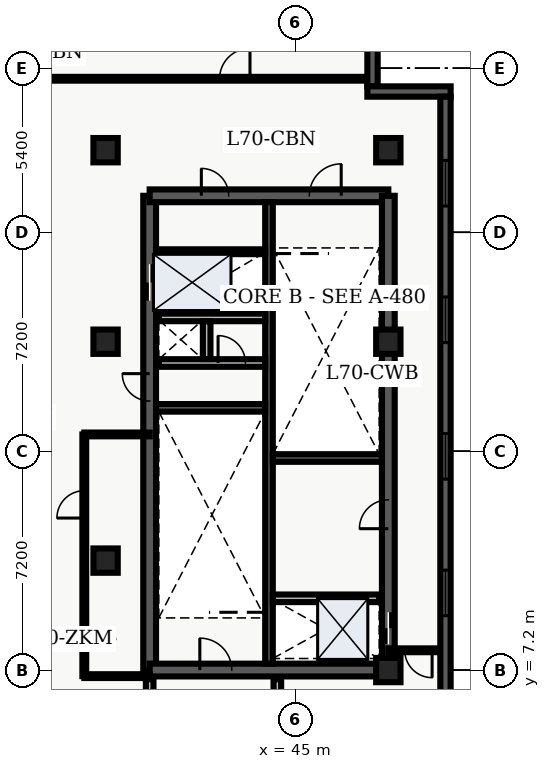
"""IFC4 building model, lengths in metres.
Left out: names, types, materials, properties, quantities, classifications, styles, units other than length and angle.
Written with IfcOpenShell. Run it as: python <this file> out.ifc"""

import sys

from ifc_helpers import new_model, entity, si_unit, converted_unit, direction, frame, origin_with_axes, origin_2d_with_axis, place, context, subcontext, project, spatial, polyline, rectangle, outline, extrude, element, fill, save


model = new_model("IFC4")
c1 = context("Model", 3, precision=1e-05, world=origin_with_axes(), true_north=direction((0.0, 1.0)))
c2 = subcontext(c1, "Body", "Model", "MODEL_VIEW")
j1 = project(units=[si_unit("LENGTHUNIT", "METRE"), converted_unit("PLANEANGLEUNIT", "DEGREE", entity("IfcPlaneAngleMeasure", 0.017), si_unit("PLANEANGLEUNIT", "RADIAN"), dimensions=[0, 0, 0, 0, 0, 0, 0])], contexts=[c1])
p1 = place(None, origin_with_axes())
s1 = spatial("IfcSite", under=j1, at=p1, CompositionType="ELEMENT")
p2 = place(p1, origin_with_axes())
s2 = spatial("IfcBuilding", under=s1, at=p2, CompositionType="ELEMENT")
p3 = place(p2, frame((0.0, 0.0, 284.1), z_axis=(0.0, 0.0, 1.0), x_axis=(1.0, 0.0, 0.0)))
s3 = spatial("IfcBuildingStorey", under=s2, at=p3, CompositionType="ELEMENT", Elevation=284.1)
p4 = place(p3, frame((40.2, 7.2, 0.0), z_axis=(0.0, 0.0, 1.0), x_axis=(0.0, 1.0, 0.0)))
e1 = element("IfcWall", 1, at=p4, inside=s3, PredefinedType="SHEAR", context=c2, shape_type="SweptSolid", body=[
    extrude(outline(polyline([(0.0, -0.21), (15.6, -0.21), (15.6, 0.21), (0.0, 0.21), (0.0, -0.21)])), origin_with_axes(), (0.0, 0.0, 1.0), 3.6),
])
p5 = place(p4, frame((12.75, 0.0, 0.0), z_axis=(0.0, 0.0, 1.0), x_axis=(1.0, 0.0, 0.0)))
e2 = element("IfcOpeningElement", 2, at=p5, cuts=e1, PredefinedType="OPENING", context=c2, shape_type="SweptSolid", body=[
    extrude(rectangle(XDim=1.2, YDim=0.44, at=origin_2d_with_axis()), origin_with_axes(), (0.0, 0.0, 1.0), 2.15),
])
p6 = place(p4, frame((9.3, 0.0, 0.0), z_axis=(0.0, 0.0, 1.0), x_axis=(1.0, 0.0, 0.0)))
e3 = element("IfcOpeningElement", 3, at=p6, cuts=e1, PredefinedType="OPENING", context=c2, shape_type="SweptSolid", body=[
    extrude(rectangle(XDim=0.9, YDim=0.44, at=origin_2d_with_axis()), origin_with_axes(), (0.0, 0.0, 1.0), 2.15),
])
p7 = place(p3, frame((40.2, 7.2, 0.0), z_axis=(0.0, 0.0, 1.0), x_axis=(1.0, 0.0, 0.0)))
e4 = element("IfcWall", 4, at=p7, inside=s3, PredefinedType="SHEAR", context=c2, shape_type="SweptSolid", body=[
    extrude(outline(polyline([(0.0, -0.21), (7.85, -0.21), (7.85, 0.21), (0.0, 0.21), (0.0, -0.21)])), origin_with_axes(), (0.0, 0.0, 1.0), 3.6),
])
p8 = place(p7, frame((2.175, 0.0, 0.0), z_axis=(0.0, 0.0, 1.0), x_axis=(1.0, 0.0, 0.0)))
e5 = element("IfcOpeningElement", 5, at=p8, cuts=e4, PredefinedType="OPENING", context=c2, shape_type="SweptSolid", body=[
    extrude(rectangle(XDim=1.05, YDim=0.44, at=origin_2d_with_axis()), origin_with_axes(), (0.0, 0.0, 1.0), 2.15),
])
p9 = place(p3, frame((40.2, 22.8, 0.0), z_axis=(0.0, 0.0, 1.0), x_axis=(1.0, 0.0, 0.0)))
e6 = element("IfcWall", 6, at=p9, inside=s3, PredefinedType="SHEAR", context=c2, shape_type="SweptSolid", body=[
    extrude(outline(polyline([(0.0, -0.21), (7.85, -0.21), (7.85, 0.21), (0.0, 0.21), (0.0, -0.21)])), origin_with_axes(), (0.0, 0.0, 1.0), 3.6),
])
p10 = place(p9, frame((5.775, 0.0, 0.0), z_axis=(0.0, 0.0, 1.0), x_axis=(1.0, 0.0, 0.0)))
e7 = element("IfcOpeningElement", 7, at=p10, cuts=e6, PredefinedType="OPENING", context=c2, shape_type="SweptSolid", body=[
    extrude(rectangle(XDim=1.05, YDim=0.44, at=origin_2d_with_axis()), origin_with_axes(), (0.0, 0.0, 1.0), 2.15),
])
p11 = place(p9, frame((2.15, 0.0, 0.0), z_axis=(0.0, 0.0, 1.0), x_axis=(1.0, 0.0, 0.0)))
e8 = element("IfcOpeningElement", 8, at=p11, cuts=e6, PredefinedType="OPENING", context=c2, shape_type="SweptSolid", body=[
    extrude(rectangle(XDim=0.9, YDim=0.44, at=origin_2d_with_axis()), origin_with_axes(), (0.0, 0.0, 1.0), 2.15),
])
p12 = place(p3, frame((48.05, 7.2, 0.0), z_axis=(0.0, 0.0, 1.0), x_axis=(0.0, 1.0, 0.0)))
e9 = element("IfcWall", 9, at=p12, inside=s3, PredefinedType="SHEAR", context=c2, shape_type="SweptSolid", body=[
    extrude(outline(polyline([(0.0, -0.21), (15.6, -0.21), (15.6, 0.21), (0.0, 0.21), (0.0, -0.21)])), origin_with_axes(), (0.0, 0.0, 1.0), 3.6),
])
p13 = place(p12, frame((1.375, 0.0, 0.0), z_axis=(0.0, 0.0, 1.0), x_axis=(1.0, 0.0, 0.0)))
e10 = element("IfcOpeningElement", 10, at=p13, cuts=e9, PredefinedType="OPENING", context=c2, shape_type="SweptSolid", body=[
    extrude(rectangle(XDim=1.05, YDim=0.44, at=origin_2d_with_axis()), origin_with_axes(), (0.0, 0.0, 1.0), 2.15),
])
p14 = place(p12, frame((5.125, 0.0, 0.0), z_axis=(0.0, 0.0, 1.0), x_axis=(1.0, 0.0, 0.0)))
e11 = element("IfcOpeningElement", 11, at=p14, cuts=e9, PredefinedType="OPENING", context=c2, shape_type="SweptSolid", body=[
    extrude(rectangle(XDim=0.95, YDim=0.44, at=origin_2d_with_axis()), origin_with_axes(), (0.0, 0.0, 1.0), 2.15),
])
p15 = place(p3, frame((44.125, 7.41, 0.0), z_axis=(0.0, 0.0, 1.0), x_axis=(0.0, 1.0, 0.0)))
e12 = element("IfcWall", 12, at=p15, inside=s3, PredefinedType="SHEAR", context=c2, shape_type="SweptSolid", body=[
    extrude(outline(polyline([(0.0, -0.125), (15.18, -0.125), (15.18, 0.125), (0.0, 0.125), (0.0, -0.125)])), origin_with_axes(), (0.0, 0.0, 1.0), 3.6),
])
for number, where, z_axis, x_axis in (
    (13, (40.41, 15.825, 0.0), (0.0, 0.0, 1.0), (1.0, 0.0, 0.0)),
    (14, (44.25, 14.175, 0.0), (0.0, 0.0, 1.0), (1.0, 0.0, 0.0)),
):
    element("IfcWall", number, at=place(p3, frame(where, z_axis=z_axis, x_axis=x_axis)), inside=s3, PredefinedType="SHEAR", context=c2, shape_type="SweptSolid", body=[
        extrude(outline(polyline([(0.0, -0.125), (3.59, -0.125), (3.59, 0.125), (0.0, 0.125), (0.0, -0.125)])), origin_with_axes(), (0.0, 0.0, 1.0), 3.6),
    ])
p16 = place(p3, frame((40.5, 17.3, 0.0), z_axis=(0.0, 0.0, 1.0), x_axis=(1.0, 0.0, 0.0)))
e15 = element("IfcWall", 15, at=p16, inside=s3, PredefinedType="SOLIDWALL", context=c2, shape_type="SweptSolid", body=[
    extrude(outline(polyline([(0.0, -0.125), (3.5, -0.125), (3.5, 0.125), (0.0, 0.125), (0.0, -0.125)])), origin_with_axes(), (0.0, 0.0, 1.0), 2.64),
])
p17 = place(p16, frame((2.4, 0.0, 0.0), z_axis=(0.0, 0.0, 1.0), x_axis=(1.0, 0.0, 0.0)))
e16 = element("IfcOpeningElement", 16, at=p17, cuts=e15, PredefinedType="OPENING", context=c2, shape_type="SweptSolid", body=[
    extrude(rectangle(XDim=0.9, YDim=0.27, at=origin_2d_with_axis()), origin_with_axes(), (0.0, 0.0, 1.0), 2.15),
])
p18 = place(p3, frame((40.5, 18.8, 0.0), z_axis=(0.0, 0.0, 1.0), x_axis=(1.0, 0.0, 0.0)))
e17 = element("IfcWall", 17, at=p18, inside=s3, PredefinedType="SOLIDWALL", context=c2, shape_type="SweptSolid", body=[
    extrude(outline(polyline([(0.0, -0.125), (3.5, -0.125), (3.5, 0.125), (0.0, 0.125), (0.0, -0.125)])), origin_with_axes(), (0.0, 0.0, 1.0), 2.64),
])
p19 = place(p3, frame((42.075, 17.43, 0.0), z_axis=(0.0, 0.0, 1.0), x_axis=(0.0, 1.0, 0.0)))
e18 = element("IfcWall", 18, at=p19, inside=s3, PredefinedType="SOLIDWALL", context=c2, shape_type="SweptSolid", body=[
    extrude(outline(polyline([(0.0, -0.125), (1.24, -0.125), (1.24, 0.125), (0.0, 0.125), (0.0, -0.125)])), origin_with_axes(), (0.0, 0.0, 1.0), 2.64),
])
p20 = place(p3, frame((40.2, 3.1, 0.0), z_axis=(0.0, 0.0, 1.0), x_axis=(0.0, 1.0, 0.0)))
e19 = element("IfcWall", 19, at=p20, inside=s3, PredefinedType="SOLIDWALL", context=c2, shape_type="SweptSolid", body=[
    extrude(outline(polyline([(0.0, -0.125), (3.8, -0.125), (3.8, 0.125), (0.0, 0.125), (0.0, -0.125)])), origin_with_axes(), (0.0, 0.0, 1.0), 2.64),
])
p21 = place(p20, frame((2.075, 0.0, 0.0), z_axis=(0.0, 0.0, 1.0), x_axis=(1.0, 0.0, 0.0)))
e20 = element("IfcOpeningElement", 20, at=p21, cuts=e19, PredefinedType="OPENING", context=c2, shape_type="SweptSolid", body=[
    extrude(rectangle(XDim=1.05, YDim=0.27, at=origin_2d_with_axis()), origin_with_axes(), (0.0, 0.0, 1.0), 2.15),
])
p22 = place(p3, frame((44.4, 3.1, 0.0), z_axis=(0.0, 0.0, 1.0), x_axis=(0.0, 1.0, 0.0)))
e21 = element("IfcWall", 21, at=p22, inside=s3, PredefinedType="SOLIDWALL", context=c2, shape_type="SweptSolid", body=[
    extrude(outline(polyline([(0.0, -0.125), (3.8, -0.125), (3.8, 0.125), (0.0, 0.125), (0.0, -0.125)])), origin_with_axes(), (0.0, 0.0, 1.0), 2.64),
])
for number, where, z_axis, x_axis in (
    (22, (38.75, 10.8, 0.0), (0.0, 0.0, 1.0), (1.0, 0.0, 0.0)),
    (23, (38.75, 18.0, 0.0), (0.0, 0.0, 1.0), (1.0, 0.0, 0.0)),
    (24, (38.75, 24.3, 0.0), (0.0, 0.0, 1.0), (1.0, 0.0, 0.0)),
    (25, (48.05, 7.2, 0.0), (0.0, 0.0, 1.0), (1.0, 0.0, 0.0)),
    (26, (48.05, 18.0, 0.0), (0.0, 0.0, 1.0), (1.0, 0.0, 0.0)),
    (27, (48.05, 24.3, 0.0), (0.0, 0.0, 1.0), (1.0, 0.0, 0.0)),
):
    element("IfcColumn", number, at=place(p3, frame(where, z_axis=z_axis, x_axis=x_axis)), inside=s3, PredefinedType="COLUMN", context=c2, shape_type="SweptSolid", body=[
        extrude(rectangle(XDim=0.8, YDim=0.8, at=origin_2d_with_axis()), origin_with_axes(), (0.0, 0.0, 1.0), 3.9),
    ])
p23 = place(p3, frame((40.5, 20.96, 0.0), z_axis=(0.0, 0.0, 1.0), x_axis=(1.0, 0.0, 0.0)))
e28 = element("IfcWall", 28, at=p23, inside=s3, PredefinedType="PARTITIONING", context=c2, shape_type="SweptSolid", body=[
    extrude(outline(polyline([(0.0, -0.08), (3.5, -0.08), (3.5, 0.08), (0.0, 0.08), (0.0, -0.08)])), origin_with_axes(), (0.0, 0.0, 1.0), 2.64),
])
p24 = place(p3, frame((44.25, 9.56, 0.0), z_axis=(0.0, 0.0, 1.0), x_axis=(1.0, 0.0, 0.0)))
e29 = element("IfcWall", 29, at=p24, inside=s3, PredefinedType="SOLIDWALL", context=c2, shape_type="SweptSolid", body=[
    extrude(outline(polyline([(0.0, -0.125), (3.5, -0.125), (3.5, 0.125), (0.0, 0.125), (0.0, -0.125)])), origin_with_axes(), (0.0, 0.0, 1.0), 2.64),
])
p25 = place(p3, frame((49.765, 7.85, 0.0), z_axis=(0.0, 0.0, 1.0), x_axis=(-1.0, 0.0, 0.0)))
e30 = element("IfcWall", 30, at=p25, inside=s3, PredefinedType="PARTITIONING", context=c2, shape_type="SweptSolid", body=[
    extrude(outline(polyline([(0.0, -0.062), (1.715, -0.062), (1.715, 0.062), (0.0, 0.062), (0.0, -0.062)])), origin_with_axes(), (0.0, 0.0, 1.0), 2.64),
])
p26 = place(p25, frame((0.725, 0.0, 0.0), z_axis=(0.0, 0.0, 1.0), x_axis=(1.0, 0.0, 0.0)))
e31 = element("IfcOpeningElement", 31, at=p26, cuts=e30, PredefinedType="OPENING", context=c2, shape_type="SweptSolid", body=[
    extrude(rectangle(XDim=0.9, YDim=0.145, at=origin_2d_with_axis()), origin_with_axes(), (0.0, 0.0, 1.0), 2.15),
])
p27 = place(p3, frame((34.535, 26.65, 0.0), z_axis=(0.0, 0.0, 1.0), x_axis=(1.0, 0.0, 0.0)))
e32 = element("IfcWall", 32, at=p27, inside=s3, PredefinedType="PARTITIONING", context=c2, shape_type="SweptSolid", body=[
    extrude(outline(polyline([(0.0, -0.062), (12.995, -0.062), (12.995, 0.062), (0.0, 0.062), (0.0, -0.062)])), origin_with_axes(), (0.0, 0.0, 1.0), 2.64),
])
p28 = place(p27, frame((8.465, 0.0, 0.0), z_axis=(0.0, 0.0, 1.0), x_axis=(1.0, 0.0, 0.0)))
e33 = element("IfcOpeningElement", 33, at=p28, cuts=e32, PredefinedType="OPENING", context=c2, shape_type="SweptSolid", body=[
    extrude(rectangle(XDim=1.0, YDim=0.145, at=origin_2d_with_axis()), origin_with_axes(), (0.0, 0.0, 1.0), 2.15),
])
for number, where, z_axis, x_axis in (
    (34, (38.05, 7.0, 0.0), (0.0, 0.0, 1.0), (1.0, 0.0, 0.0)),
    (35, (38.05, 14.95, 0.0), (0.0, 0.0, 1.0), (1.0, 0.0, 0.0)),
):
    element("IfcWall", number, at=place(p3, frame(where, z_axis=z_axis, x_axis=x_axis)), inside=s3, PredefinedType="PARTITIONING", context=c2, shape_type="SweptSolid", body=[
        extrude(outline(polyline([(0.0, -0.062), (2.15, -0.062), (2.15, 0.062), (0.0, 0.062), (0.0, -0.062)])), origin_with_axes(), (0.0, 0.0, 1.0), 2.64),
    ])
p29 = place(p3, frame((38.05, 7.0, 0.0), z_axis=(0.0, 0.0, 1.0), x_axis=(0.0, 1.0, 0.0)))
e36 = element("IfcWall", 36, at=p29, inside=s3, PredefinedType="PARTITIONING", context=c2, shape_type="SweptSolid", body=[
    extrude(outline(polyline([(0.0, -0.062), (7.95, -0.062), (7.95, 0.062), (0.0, 0.062), (0.0, -0.062)])), origin_with_axes(), (0.0, 0.0, 1.0), 2.64),
])
p30 = place(p29, frame((5.65, 0.0, 0.0), z_axis=(0.0, 0.0, 1.0), x_axis=(1.0, 0.0, 0.0)))
e37 = element("IfcOpeningElement", 37, at=p30, cuts=e36, PredefinedType="OPENING", context=c2, shape_type="SweptSolid", body=[
    extrude(rectangle(XDim=0.9, YDim=0.145, at=origin_2d_with_axis()), origin_with_axes(), (0.0, 0.0, 1.0), 2.15),
])
p31 = place(p3, frame((47.53, 28.46, 0.0), z_axis=(0.0, 0.0, 1.0), x_axis=(0.0, -1.0, 0.0)))
e38 = element("IfcWall", 38, at=p31, inside=s3, PredefinedType="SOLIDWALL", context=c2, shape_type="SweptSolid", body=[
    extrude(outline(polyline([(0.0, -0.17), (2.06, -0.17), (2.06, 0.17), (0.0, 0.17), (0.0, -0.17)])), origin_with_axes(), (0.0, 0.0, 1.0), 3.6),
])
p32 = place(p3, frame((47.36, 26.23, 0.0), z_axis=(0.0, 0.0, 1.0), x_axis=(1.0, 0.0, 0.0)))
e39 = element("IfcWall", 39, at=p32, inside=s3, PredefinedType="SOLIDWALL", context=c2, shape_type="SweptSolid", body=[
    extrude(outline(polyline([(0.0, -0.17), (2.74, -0.17), (2.74, 0.17), (0.0, 0.17), (0.0, -0.17)])), origin_with_axes(), (0.0, 0.0, 1.0), 3.6),
])
p33 = place(p3, frame((49.93, 26.06, 0.0), z_axis=(0.0, 0.0, 1.0), x_axis=(0.0, -1.0, 0.0)))
e40 = element("IfcWall", 40, at=p33, inside=s3, PredefinedType="SOLIDWALL", context=c2, shape_type="SweptSolid", body=[
    extrude(outline(polyline([(0.0, -0.17), (23.66, -0.17), (23.66, 0.17), (0.0, 0.17), (0.0, -0.17)])), origin_with_axes(), (0.0, 0.0, 1.0), 3.6),
])
p34 = place(p33, frame((2.846, 0.0, 0.45), z_axis=(0.0, 0.0, 1.0), x_axis=(1.0, 0.0, 0.0)))
e41 = element("IfcOpeningElement", 41, at=p34, cuts=e40, PredefinedType="OPENING", context=c2, shape_type="SweptSolid", body=[
    extrude(rectangle(XDim=1.5, YDim=0.36, at=origin_2d_with_axis()), origin_with_axes(), (0.0, 0.0, 1.0), 2.1),
])
p35 = place(p33, frame((7.338, 0.0, 0.45), z_axis=(0.0, 0.0, 1.0), x_axis=(1.0, 0.0, 0.0)))
e42 = element("IfcOpeningElement", 42, at=p35, cuts=e40, PredefinedType="OPENING", context=c2, shape_type="SweptSolid", body=[
    extrude(rectangle(XDim=1.5, YDim=0.36, at=origin_2d_with_axis()), origin_with_axes(), (0.0, 0.0, 1.0), 2.1),
])
p36 = place(p33, frame((11.83, 0.0, 0.45), z_axis=(0.0, 0.0, 1.0), x_axis=(1.0, 0.0, 0.0)))
e43 = element("IfcOpeningElement", 43, at=p36, cuts=e40, PredefinedType="OPENING", context=c2, shape_type="SweptSolid", body=[
    extrude(rectangle(XDim=1.5, YDim=0.36, at=origin_2d_with_axis()), origin_with_axes(), (0.0, 0.0, 1.0), 2.1),
])
p37 = place(p33, frame((16.322, 0.0, 0.45), z_axis=(0.0, 0.0, 1.0), x_axis=(1.0, 0.0, 0.0)))
e44 = element("IfcOpeningElement", 44, at=p37, cuts=e40, PredefinedType="OPENING", context=c2, shape_type="SweptSolid", body=[
    extrude(rectangle(XDim=1.5, YDim=0.36, at=origin_2d_with_axis()), origin_with_axes(), (0.0, 0.0, 1.0), 2.1),
])
p38 = place(p33, frame((20.814, 0.0, 0.45), z_axis=(0.0, 0.0, 1.0), x_axis=(1.0, 0.0, 0.0)))
e45 = element("IfcOpeningElement", 45, at=p38, cuts=e40, PredefinedType="OPENING", context=c2, shape_type="SweptSolid", body=[
    extrude(rectangle(XDim=1.5, YDim=0.36, at=origin_2d_with_axis()), origin_with_axes(), (0.0, 0.0, 1.0), 2.1),
])
p39 = place(p12, frame((1.375, 0.0, 0.0), z_axis=(0.0, 0.0, 1.0), x_axis=(1.0, 0.0, 0.0)))
e46 = element("IfcDoor", 46, at=p39, inside=s3, OperationType="SLIDING_TO_LEFT", PredefinedType="DOOR", context=c2, shape_type="SweptSolid", body=[
    extrude(rectangle(XDim=1.05, YDim=0.09, at=origin_2d_with_axis()), origin_with_axes(), (0.0, 0.0, 1.0), 2.15),
])
fill(e10, e46)
p40 = place(p4, frame((12.75, 0.0, 0.0), z_axis=(0.0, 0.0, 1.0), x_axis=(1.0, 0.0, 0.0)))
e47 = element("IfcDoor", 47, at=p40, inside=s3, OperationType="DOUBLE_DOOR_SLIDING", PredefinedType="DOOR", context=c2, shape_type="SweptSolid", body=[
    extrude(rectangle(XDim=1.2, YDim=0.09, at=origin_2d_with_axis()), origin_with_axes(), (0.0, 0.0, 1.0), 2.15),
])
fill(e2, e47)
p41 = place(p4, frame((9.3, 0.0, 0.0), z_axis=(0.0, 0.0, 1.0), x_axis=(1.0, 0.0, 0.0)))
e48 = element("IfcDoor", 48, at=p41, inside=s3, OperationType="SINGLE_SWING_RIGHT", PredefinedType="DOOR", context=c2, shape_type="SweptSolid", body=[
    extrude(rectangle(XDim=0.9, YDim=0.09, at=origin_2d_with_axis()), origin_with_axes(), (0.0, 0.0, 1.0), 2.15),
])
fill(e3, e48)
p42 = place(p16, frame((2.4, 0.0, 0.0), z_axis=(0.0, 0.0, 1.0), x_axis=(1.0, 0.0, 0.0)))
e49 = element("IfcDoor", 49, at=p42, inside=s3, OperationType="SINGLE_SWING_LEFT", PredefinedType="DOOR", context=c2, shape_type="SweptSolid", body=[
    extrude(rectangle(XDim=0.9, YDim=0.09, at=origin_2d_with_axis()), origin_with_axes(), (0.0, 0.0, 1.0), 2.15),
])
fill(e16, e49)
p43 = place(p7, frame((2.175, 0.0, 0.0), z_axis=(0.0, 0.0, 1.0), x_axis=(1.0, 0.0, 0.0)))
e50 = element("IfcDoor", 50, at=p43, inside=s3, OperationType="SINGLE_SWING_LEFT", PredefinedType="DOOR", context=c2, shape_type="SweptSolid", body=[
    extrude(rectangle(XDim=1.05, YDim=0.09, at=origin_2d_with_axis()), origin_with_axes(), (0.0, 0.0, 1.0), 2.15),
])
fill(e5, e50)
p44 = place(p9, frame((5.775, 0.0, 0.0), z_axis=(0.0, 0.0, 1.0), x_axis=(1.0, 0.0, 0.0)))
e51 = element("IfcDoor", 51, at=p44, inside=s3, OperationType="SINGLE_SWING_RIGHT", PredefinedType="DOOR", context=c2, shape_type="SweptSolid", body=[
    extrude(rectangle(XDim=1.05, YDim=0.09, at=origin_2d_with_axis()), origin_with_axes(), (0.0, 0.0, 1.0), 2.15),
])
fill(e7, e51)
p45 = place(p9, frame((2.15, 0.0, 0.0), z_axis=(0.0, 0.0, 1.0), x_axis=(1.0, 0.0, 0.0)))
e52 = element("IfcDoor", 52, at=p45, inside=s3, OperationType="SINGLE_SWING_LEFT", PredefinedType="DOOR", context=c2, shape_type="SweptSolid", body=[
    extrude(rectangle(XDim=0.9, YDim=0.09, at=origin_2d_with_axis()), origin_with_axes(), (0.0, 0.0, 1.0), 2.15),
])
fill(e8, e52)
p46 = place(p12, frame((5.125, 0.0, 0.0), z_axis=(0.0, 0.0, 1.0), x_axis=(1.0, 0.0, 0.0)))
e53 = element("IfcDoor", 53, at=p46, inside=s3, OperationType="SINGLE_SWING_LEFT", PredefinedType="DOOR", context=c2, shape_type="SweptSolid", body=[
    extrude(rectangle(XDim=0.95, YDim=0.09, at=origin_2d_with_axis()), origin_with_axes(), (0.0, 0.0, 1.0), 2.15),
])
fill(e11, e53)
p47 = place(p25, frame((0.725, 0.0, 0.0), z_axis=(0.0, 0.0, 1.0), x_axis=(1.0, 0.0, 0.0)))
e54 = element("IfcDoor", 54, at=p47, inside=s3, OperationType="SINGLE_SWING_LEFT", PredefinedType="DOOR", context=c2, shape_type="SweptSolid", body=[
    extrude(rectangle(XDim=0.9, YDim=0.075, at=origin_2d_with_axis()), origin_with_axes(), (0.0, 0.0, 1.0), 2.15),
])
fill(e31, e54)
p48 = place(p27, frame((8.465, 0.0, 0.0), z_axis=(0.0, 0.0, 1.0), x_axis=(1.0, 0.0, 0.0)))
e55 = element("IfcDoor", 55, at=p48, inside=s3, OperationType="SINGLE_SWING_RIGHT", PredefinedType="DOOR", context=c2, shape_type="SweptSolid", body=[
    extrude(rectangle(XDim=1.0, YDim=0.075, at=origin_2d_with_axis()), origin_with_axes(), (0.0, 0.0, 1.0), 2.15),
])
fill(e33, e55)
p49 = place(p29, frame((5.65, 0.0, 0.0), z_axis=(0.0, 0.0, 1.0), x_axis=(1.0, 0.0, 0.0)))
e56 = element("IfcDoor", 56, at=p49, inside=s3, OperationType="SINGLE_SWING_LEFT", PredefinedType="DOOR", context=c2, shape_type="SweptSolid", body=[
    extrude(rectangle(XDim=0.9, YDim=0.075, at=origin_2d_with_axis()), origin_with_axes(), (0.0, 0.0, 1.0), 2.15),
])
fill(e37, e56)
p50 = place(p33, frame((2.846, 0.0, 0.45), z_axis=(0.0, 0.0, 1.0), x_axis=(1.0, 0.0, 0.0)))
e57 = element("IfcWindow", 57, at=p50, inside=s3, PredefinedType="WINDOW", context=c2, shape_type="SweptSolid", body=[
    extrude(rectangle(XDim=1.5, YDim=0.09, at=origin_2d_with_axis()), origin_with_axes(), (0.0, 0.0, 1.0), 2.1),
])
fill(e41, e57)
p51 = place(p33, frame((7.338, 0.0, 0.45), z_axis=(0.0, 0.0, 1.0), x_axis=(1.0, 0.0, 0.0)))
e58 = element("IfcWindow", 58, at=p51, inside=s3, PredefinedType="WINDOW", context=c2, shape_type="SweptSolid", body=[
    extrude(rectangle(XDim=1.5, YDim=0.09, at=origin_2d_with_axis()), origin_with_axes(), (0.0, 0.0, 1.0), 2.1),
])
fill(e42, e58)
p52 = place(p33, frame((11.83, 0.0, 0.45), z_axis=(0.0, 0.0, 1.0), x_axis=(1.0, 0.0, 0.0)))
e59 = element("IfcWindow", 59, at=p52, inside=s3, PredefinedType="WINDOW", context=c2, shape_type="SweptSolid", body=[
    extrude(rectangle(XDim=1.5, YDim=0.09, at=origin_2d_with_axis()), origin_with_axes(), (0.0, 0.0, 1.0), 2.1),
])
fill(e43, e59)
p53 = place(p33, frame((16.322, 0.0, 0.45), z_axis=(0.0, 0.0, 1.0), x_axis=(1.0, 0.0, 0.0)))
e60 = element("IfcWindow", 60, at=p53, inside=s3, PredefinedType="WINDOW", context=c2, shape_type="SweptSolid", body=[
    extrude(rectangle(XDim=1.5, YDim=0.09, at=origin_2d_with_axis()), origin_with_axes(), (0.0, 0.0, 1.0), 2.1),
])
fill(e44, e60)
save(model, sys.argv[1])
